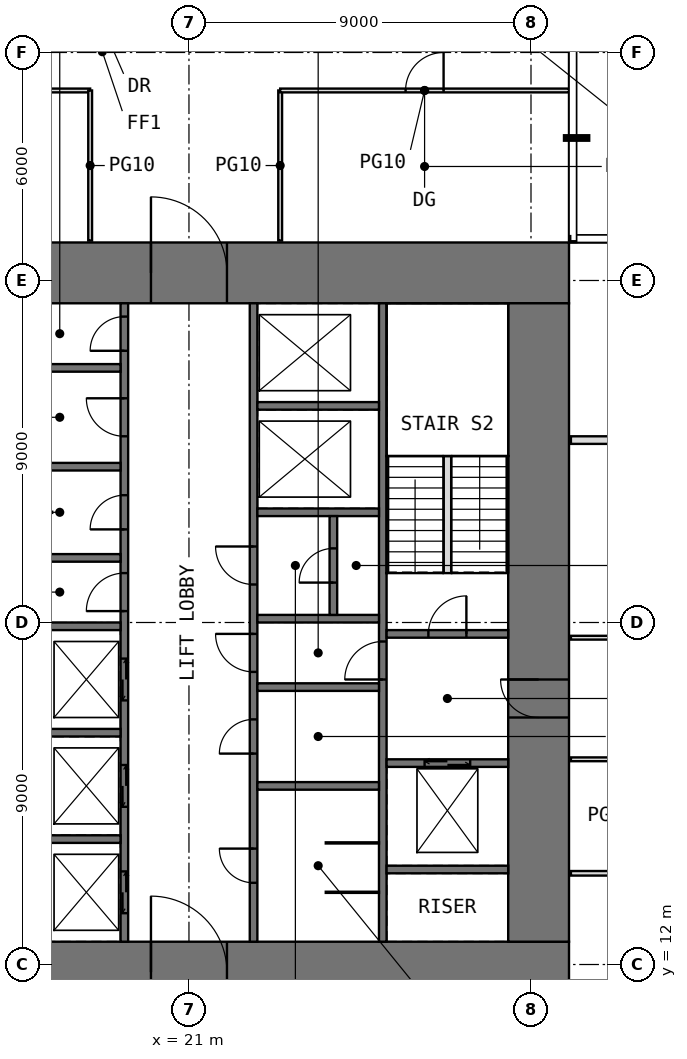
"""IFC4 building model, lengths in metres.
Left out: names, types, materials, properties, quantities, classifications, styles, units other than length and angle.
Written with IfcOpenShell. Run it as: python <this file> out.ifc"""

import sys

from ifc_helpers import new_model, si_unit, direction, frame, frame_2d, origin, place, context, subcontext, project, spatial, rectangle, extrude, element, fill, save


model = new_model("IFC4")
c1 = context("Model", 3, precision=1e-05, world=origin(), true_north=direction((0.0, 1.0)))
c2 = subcontext(c1, "Body", "Model", "MODEL_VIEW")
j1 = project(units=[si_unit("LENGTHUNIT", "METRE"), si_unit("PLANEANGLEUNIT", "RADIAN")], contexts=[c1])
p1 = place(None, origin())
s1 = spatial("IfcSite", under=j1, at=p1, CompositionType="ELEMENT")
p2 = place(p1, origin())
s2 = spatial("IfcBuilding", under=s1, at=p2, CompositionType="ELEMENT")
p3 = place(p2, frame((0.0, 0.0, 116.5)))
s3 = spatial("IfcBuildingStorey", under=s2, at=p3, CompositionType="ELEMENT", Elevation=116.5)
p4 = place(p3, frame((11.0, 11.8, -0.05), z_axis=(0.0, 0.0, 1.0), x_axis=(1.0, 0.0, 0.0)))
e1 = element("IfcWall", 1, at=p4, inside=s3, PredefinedType="SHEAR", context=c2, shape_type="SweptSolid", body=[
    extrude(rectangle(XDim=20.0, YDim=1.6, at=frame_2d((10.0, 0.0))), origin(), (0.0, 0.0, 1.0), 4.0),
])
p5 = place(p4, frame((9.0, 0.0, 0.05)))
e2 = element("IfcOpeningElement", 2, at=p5, cuts=e1, PredefinedType="OPENING", context=c2, shape_type="SweptSolid", body=[
    extrude(rectangle(XDim=2.0, YDim=2.2, at=frame_2d((1.0, 1.1))), frame((0.0, 0.81, 0.0), z_axis=(0.0, -1.0, 0.0), x_axis=(1.0, 0.0, 0.0)), (0.0, 0.0, 1.0), 1.62),
])
p6 = place(p3, frame((11.0, 30.2, -0.05), z_axis=(0.0, 0.0, 1.0), x_axis=(1.0, 0.0, 0.0)))
e3 = element("IfcWall", 3, at=p6, inside=s3, PredefinedType="SHEAR", context=c2, shape_type="SweptSolid", body=[
    extrude(rectangle(XDim=20.0, YDim=1.6, at=frame_2d((10.0, 0.0))), origin(), (0.0, 0.0, 1.0), 4.0),
])
p7 = place(p6, frame((9.0, 0.0, 0.05)))
e4 = element("IfcOpeningElement", 4, at=p7, cuts=e3, PredefinedType="OPENING", context=c2, shape_type="SweptSolid", body=[
    extrude(rectangle(XDim=2.0, YDim=2.2, at=frame_2d((1.0, 1.1))), frame((0.0, 0.81, 0.0), z_axis=(0.0, -1.0, 0.0), x_axis=(1.0, 0.0, 0.0)), (0.0, 0.0, 1.0), 1.62),
])
p8 = place(p3, frame((30.2, 12.6, -0.05), z_axis=(0.0, 0.0, 1.0), x_axis=(0.0, 1.0, 0.0)))
e5 = element("IfcWall", 5, at=p8, inside=s3, PredefinedType="SHEAR", context=c2, shape_type="SweptSolid", body=[
    extrude(rectangle(XDim=16.8, YDim=1.6, at=frame_2d((8.4, 0.0))), origin(), (0.0, 0.0, 1.0), 4.0),
])
p9 = place(p8, frame((5.9, 0.0, 0.05)))
e6 = element("IfcOpeningElement", 6, at=p9, cuts=e5, PredefinedType="OPENING", context=c2, shape_type="SweptSolid", body=[
    extrude(rectangle(XDim=1.0, YDim=2.2, at=frame_2d((0.5, 1.1))), frame((0.0, 0.81, 0.0), z_axis=(0.0, -1.0, 0.0), x_axis=(1.0, 0.0, 0.0)), (0.0, 0.0, 1.0), 1.62),
])
p10 = place(p3, frame((19.3, 12.6, -0.05), z_axis=(0.0, 0.0, 1.0), x_axis=(0.0, 1.0, 0.0)))
e7 = element("IfcWall", 7, at=p10, inside=s3, PredefinedType="SHEAR", context=c2, shape_type="SweptSolid", body=[
    extrude(rectangle(XDim=16.8, YDim=0.2, at=frame_2d((8.4, 0.0))), origin(), (0.0, 0.0, 1.0), 4.0),
])
p11 = place(p10, frame((8.7, 0.0, 0.05)))
e8 = element("IfcOpeningElement", 8, at=p11, cuts=e7, PredefinedType="OPENING", context=c2, shape_type="SweptSolid", body=[
    extrude(rectangle(XDim=1.0, YDim=2.2, at=frame_2d((0.5, 1.1))), frame((0.0, 0.11, 0.0), z_axis=(0.0, -1.0, 0.0), x_axis=(1.0, 0.0, 0.0)), (0.0, 0.0, 1.0), 0.22),
])
p12 = place(p10, frame((10.85, 0.0, 0.05)))
e9 = element("IfcOpeningElement", 9, at=p12, cuts=e7, PredefinedType="OPENING", context=c2, shape_type="SweptSolid", body=[
    extrude(rectangle(XDim=0.9, YDim=2.2, at=frame_2d((0.45, 1.1))), frame((0.0, 0.11, 0.0), z_axis=(0.0, -1.0, 0.0), x_axis=(1.0, 0.0, 0.0)), (0.0, 0.0, 1.0), 0.22),
])
p13 = place(p10, frame((13.3, 0.0, 0.05)))
e10 = element("IfcOpeningElement", 10, at=p13, cuts=e7, PredefinedType="OPENING", context=c2, shape_type="SweptSolid", body=[
    extrude(rectangle(XDim=1.0, YDim=2.2, at=frame_2d((0.5, 1.1))), frame((0.0, 0.11, 0.0), z_axis=(0.0, -1.0, 0.0), x_axis=(1.0, 0.0, 0.0)), (0.0, 0.0, 1.0), 0.22),
])
p14 = place(p10, frame((15.55, 0.0, 0.05)))
e11 = element("IfcOpeningElement", 11, at=p14, cuts=e7, PredefinedType="OPENING", context=c2, shape_type="SweptSolid", body=[
    extrude(rectangle(XDim=0.9, YDim=2.2, at=frame_2d((0.45, 1.1))), frame((0.0, 0.11, 0.0), z_axis=(0.0, -1.0, 0.0), x_axis=(1.0, 0.0, 0.0)), (0.0, 0.0, 1.0), 0.22),
])
p15 = place(p10, frame((0.75, 0.0, 0.05)))
e12 = element("IfcOpeningElement", 12, at=p15, cuts=e7, PredefinedType="OPENING", context=c2, shape_type="SweptSolid", body=[
    extrude(rectangle(XDim=1.1, YDim=2.2, at=frame_2d((0.55, 1.1))), frame((0.0, 0.11, 0.0), z_axis=(0.0, -1.0, 0.0), x_axis=(1.0, 0.0, 0.0)), (0.0, 0.0, 1.0), 0.22),
])
p16 = place(p10, frame((3.55, 0.0, 0.05)))
e13 = element("IfcOpeningElement", 13, at=p16, cuts=e7, PredefinedType="OPENING", context=c2, shape_type="SweptSolid", body=[
    extrude(rectangle(XDim=1.1, YDim=2.2, at=frame_2d((0.55, 1.1))), frame((0.0, 0.11, 0.0), z_axis=(0.0, -1.0, 0.0), x_axis=(1.0, 0.0, 0.0)), (0.0, 0.0, 1.0), 0.22),
])
p17 = place(p10, frame((6.35, 0.0, 0.05)))
e14 = element("IfcOpeningElement", 14, at=p17, cuts=e7, PredefinedType="OPENING", context=c2, shape_type="SweptSolid", body=[
    extrude(rectangle(XDim=1.1, YDim=2.2, at=frame_2d((0.55, 1.1))), frame((0.0, 0.11, 0.0), z_axis=(0.0, -1.0, 0.0), x_axis=(1.0, 0.0, 0.0)), (0.0, 0.0, 1.0), 0.22),
])
p18 = place(p3, frame((22.7, 12.6, -0.05), z_axis=(0.0, 0.0, 1.0), x_axis=(0.0, 1.0, 0.0)))
e15 = element("IfcWall", 15, at=p18, inside=s3, PredefinedType="SHEAR", context=c2, shape_type="SweptSolid", body=[
    extrude(rectangle(XDim=16.8, YDim=0.2, at=frame_2d((8.4, 0.0))), origin(), (0.0, 0.0, 1.0), 4.0),
])
p19 = place(p18, frame((7.1, 0.0, 0.05)))
e16 = element("IfcOpeningElement", 16, at=p19, cuts=e15, PredefinedType="OPENING", context=c2, shape_type="SweptSolid", body=[
    extrude(rectangle(XDim=1.0, YDim=2.2, at=frame_2d((0.5, 1.1))), frame((0.0, 0.11, 0.0), z_axis=(0.0, -1.0, 0.0), x_axis=(1.0, 0.0, 0.0)), (0.0, 0.0, 1.0), 0.22),
])
p20 = place(p18, frame((1.55, 0.0, 0.05)))
e17 = element("IfcOpeningElement", 17, at=p20, cuts=e15, PredefinedType="OPENING", context=c2, shape_type="SweptSolid", body=[
    extrude(rectangle(XDim=0.9, YDim=2.2, at=frame_2d((0.45, 1.1))), frame((0.0, 0.11, 0.0), z_axis=(0.0, -1.0, 0.0), x_axis=(1.0, 0.0, 0.0)), (0.0, 0.0, 1.0), 0.22),
])
p21 = place(p18, frame((4.95, 0.0, 0.05)))
e18 = element("IfcOpeningElement", 18, at=p21, cuts=e15, PredefinedType="OPENING", context=c2, shape_type="SweptSolid", body=[
    extrude(rectangle(XDim=0.9, YDim=2.2, at=frame_2d((0.45, 1.1))), frame((0.0, 0.11, 0.0), z_axis=(0.0, -1.0, 0.0), x_axis=(1.0, 0.0, 0.0)), (0.0, 0.0, 1.0), 0.22),
])
p22 = place(p18, frame((9.4, 0.0, 0.05)))
e19 = element("IfcOpeningElement", 19, at=p22, cuts=e15, PredefinedType="OPENING", context=c2, shape_type="SweptSolid", body=[
    extrude(rectangle(XDim=1.0, YDim=2.2, at=frame_2d((0.5, 1.1))), frame((0.0, 0.11, 0.0), z_axis=(0.0, -1.0, 0.0), x_axis=(1.0, 0.0, 0.0)), (0.0, 0.0, 1.0), 0.22),
])
p23 = place(p3, frame((26.1, 12.6, -0.05), z_axis=(0.0, 0.0, 1.0), x_axis=(0.0, 1.0, 0.0)))
e20 = element("IfcWall", 20, at=p23, inside=s3, PredefinedType="SHEAR", context=c2, shape_type="SweptSolid", body=[
    extrude(rectangle(XDim=16.8, YDim=0.2, at=frame_2d((8.4, 0.0))), origin(), (0.0, 0.0, 1.0), 4.0),
])
p24 = place(p23, frame((6.9, 0.0, 0.05)))
e21 = element("IfcOpeningElement", 21, at=p24, cuts=e20, PredefinedType="OPENING", context=c2, shape_type="SweptSolid", body=[
    extrude(rectangle(XDim=1.0, YDim=2.2, at=frame_2d((0.5, 1.1))), frame((0.0, 0.11, 0.0), z_axis=(0.0, -1.0, 0.0), x_axis=(1.0, 0.0, 0.0)), (0.0, 0.0, 1.0), 0.22),
])
for number, where, z_axis, x_axis in (
    (22, (16.0, 15.3, -0.05), (0.0, 0.0, 1.0), (1.0, 0.0, 0.0)),
    (23, (16.0, 18.1, -0.05), (0.0, 0.0, 1.0), (1.0, 0.0, 0.0)),
    (24, (16.0, 20.9, -0.05), (0.0, 0.0, 1.0), (1.0, 0.0, 0.0)),
    (25, (16.0, 22.7, -0.05), (0.0, 0.0, 1.0), (1.0, 0.0, 0.0)),
    (26, (16.0, 25.1, -0.05), (0.0, 0.0, 1.0), (1.0, 0.0, 0.0)),
    (27, (16.0, 27.7, -0.05), (0.0, 0.0, 1.0), (1.0, 0.0, 0.0)),
    (28, (22.8, 16.7, -0.05), (0.0, 0.0, 1.0), (1.0, 0.0, 0.0)),
    (29, (22.8, 19.3, -0.05), (0.0, 0.0, 1.0), (1.0, 0.0, 0.0)),
    (30, (22.8, 21.1, -0.05), (0.0, 0.0, 1.0), (1.0, 0.0, 0.0)),
    (31, (22.8, 23.9, -0.05), (0.0, 0.0, 1.0), (1.0, 0.0, 0.0)),
    (32, (22.8, 26.7, -0.05), (0.0, 0.0, 1.0), (1.0, 0.0, 0.0)),
    (33, (26.2, 14.5, -0.05), (0.0, 0.0, 1.0), (1.0, 0.0, 0.0)),
):
    element("IfcWall", number, at=place(p3, frame(where, z_axis=z_axis, x_axis=x_axis)), inside=s3, PredefinedType="SHEAR", context=c2, shape_type="SweptSolid", body=[
        extrude(rectangle(XDim=3.2, YDim=0.2, at=frame_2d((1.6, 0.0))), origin(), (0.0, 0.0, 1.0), 4.0),
    ])
p25 = place(p3, frame((26.2, 17.3, -0.05), z_axis=(0.0, 0.0, 1.0), x_axis=(1.0, 0.0, 0.0)))
e34 = element("IfcWall", 34, at=p25, inside=s3, PredefinedType="SHEAR", context=c2, shape_type="SweptSolid", body=[
    extrude(rectangle(XDim=3.2, YDim=0.2, at=frame_2d((1.6, 0.0))), origin(), (0.0, 0.0, 1.0), 4.0),
])
p26 = place(p25, frame((1.0, 0.0, 0.05)))
e35 = element("IfcOpeningElement", 35, at=p26, cuts=e34, PredefinedType="OPENING", context=c2, shape_type="SweptSolid", body=[
    extrude(rectangle(XDim=1.2, YDim=2.2, at=frame_2d((0.6, 1.1))), frame((0.0, 0.11, 0.0), z_axis=(0.0, -1.0, 0.0), x_axis=(1.0, 0.0, 0.0)), (0.0, 0.0, 1.0), 0.22),
])
p27 = place(p3, frame((26.2, 20.7, -0.05), z_axis=(0.0, 0.0, 1.0), x_axis=(1.0, 0.0, 0.0)))
e36 = element("IfcWall", 36, at=p27, inside=s3, PredefinedType="SHEAR", context=c2, shape_type="SweptSolid", body=[
    extrude(rectangle(XDim=3.2, YDim=0.2, at=frame_2d((1.6, 0.0))), origin(), (0.0, 0.0, 1.0), 4.0),
])
p28 = place(p27, frame((1.1, 0.0, 0.05)))
e37 = element("IfcOpeningElement", 37, at=p28, cuts=e36, PredefinedType="OPENING", context=c2, shape_type="SweptSolid", body=[
    extrude(rectangle(XDim=1.0, YDim=2.2, at=frame_2d((0.5, 1.1))), frame((0.0, 0.11, 0.0), z_axis=(0.0, -1.0, 0.0), x_axis=(1.0, 0.0, 0.0)), (0.0, 0.0, 1.0), 0.22),
])
for number, where, z_axis, x_axis in (
    (38, (24.6, 13.9, 0.0), (0.0, 0.0, 1.0), (1.0, 0.0, 0.0)),
    (39, (24.6, 15.2, 0.0), (0.0, 0.0, 1.0), (1.0, 0.0, 0.0)),
):
    element("IfcWall", number, at=place(p3, frame(where, z_axis=z_axis, x_axis=x_axis)), inside=s3, PredefinedType="PARTITIONING", context=c2, shape_type="SweptSolid", body=[
        extrude(rectangle(XDim=1.4, YDim=0.03, at=frame_2d((0.7, 0.0))), origin(), (0.0, 0.0, 1.0), 3.75),
    ])
p29 = place(p3, frame((24.8, 21.2, -0.05), z_axis=(0.0, 0.0, 1.0), x_axis=(0.0, 1.0, 0.0)))
e40 = element("IfcWall", 40, at=p29, inside=s3, PredefinedType="SHEAR", context=c2, shape_type="SweptSolid", body=[
    extrude(rectangle(XDim=2.6, YDim=0.2, at=frame_2d((1.3, 0.0))), origin(), (0.0, 0.0, 1.0), 4.0),
])
p30 = place(p29, frame((0.85, 0.0, 0.05)))
e41 = element("IfcOpeningElement", 41, at=p30, cuts=e40, PredefinedType="OPENING", context=c2, shape_type="SweptSolid", body=[
    extrude(rectangle(XDim=0.9, YDim=2.2, at=frame_2d((0.45, 1.1))), frame((0.0, 0.11, 0.0), z_axis=(0.0, -1.0, 0.0), x_axis=(1.0, 0.0, 0.0)), (0.0, 0.0, 1.0), 0.22),
])
p31 = place(p3, frame((14.6, 35.0, 0.0), z_axis=(0.0, 0.0, 1.0), x_axis=(1.0, 0.0, 0.0)))
e42 = element("IfcWall", 42, at=p31, inside=s3, PredefinedType="PARTITIONING", context=c2, shape_type="SweptSolid", body=[
    extrude(rectangle(XDim=3.8, YDim=0.1, at=frame_2d((1.9, 0.0))), origin(), (0.0, 0.0, 1.0), 3.75),
])
p32 = place(p31, frame((1.4, 0.0, 0.0)))
e43 = element("IfcOpeningElement", 43, at=p32, cuts=e42, PredefinedType="OPENING", context=c2, shape_type="SweptSolid", body=[
    extrude(rectangle(XDim=1.0, YDim=2.4, at=frame_2d((0.5, 1.2))), frame((0.0, 0.06, 0.0), z_axis=(0.0, -1.0, 0.0), x_axis=(1.0, 0.0, 0.0)), (0.0, 0.0, 1.0), 0.12),
])
for number, where, z_axis, x_axis in (
    (44, (18.4, 31.05, 0.0), (0.0, 0.0, 1.0), (0.0, 1.0, 0.0)),
    (45, (23.4, 31.05, 0.0), (0.0, 0.0, 1.0), (0.0, 1.0, 0.0)),
):
    element("IfcWall", number, at=place(p3, frame(where, z_axis=z_axis, x_axis=x_axis)), inside=s3, PredefinedType="PARTITIONING", context=c2, shape_type="SweptSolid", body=[
        extrude(rectangle(XDim=3.95, YDim=0.1, at=frame_2d((1.975, 0.0))), origin(), (0.0, 0.0, 1.0), 3.75),
    ])
p33 = place(p3, frame((23.4, 35.0, 0.0), z_axis=(0.0, 0.0, 1.0), x_axis=(1.0, 0.0, 0.0)))
e46 = element("IfcWall", 46, at=p33, inside=s3, PredefinedType="PARTITIONING", context=c2, shape_type="SweptSolid", body=[
    extrude(rectangle(XDim=7.6, YDim=0.1, at=frame_2d((3.8, 0.0))), origin(), (0.0, 0.0, 1.0), 3.75),
])
p34 = place(p33, frame((3.3, 0.0, 0.0)))
e47 = element("IfcOpeningElement", 47, at=p34, cuts=e46, PredefinedType="OPENING", context=c2, shape_type="SweptSolid", body=[
    extrude(rectangle(XDim=1.0, YDim=2.4, at=frame_2d((0.5, 1.2))), frame((0.0, 0.06, 0.0), z_axis=(0.0, -1.0, 0.0), x_axis=(1.0, 0.0, 0.0)), (0.0, 0.0, 1.0), 0.12),
])
p35 = place(p3, frame((31.05, 14.4, 0.0), z_axis=(0.0, 0.0, 1.0), x_axis=(1.0, 0.0, 0.0)))
e48 = element("IfcWall", 48, at=p35, inside=s3, PredefinedType="PARTITIONING", context=c2, shape_type="SweptSolid", body=[
    extrude(rectangle(XDim=3.45, YDim=0.12, at=frame_2d((1.725, 0.0))), origin(), (0.0, 0.0, 1.0), 3.75),
])
for number, where, z_axis, x_axis in (
    (49, (31.05, 17.4, 0.0), (0.0, 0.0, 1.0), (1.0, 0.0, 0.0)),
    (50, (31.05, 20.6, 0.0), (0.0, 0.0, 1.0), (1.0, 0.0, 0.0)),
):
    element("IfcWall", number, at=place(p3, frame(where, z_axis=z_axis, x_axis=x_axis)), inside=s3, PredefinedType="PARTITIONING", context=c2, shape_type="SweptSolid", body=[
        extrude(rectangle(XDim=3.95, YDim=0.1, at=frame_2d((1.975, 0.0))), origin(), (0.0, 0.0, 1.0), 3.75),
    ])
p36 = place(p3, frame((31.05, 25.8, 0.0), z_axis=(0.0, 0.0, 1.0), x_axis=(1.0, 0.0, 0.0)))
e51 = element("IfcWall", 51, at=p36, inside=s3, PredefinedType="PARTITIONING", context=c2, shape_type="SweptSolid", body=[
    extrude(rectangle(XDim=3.95, YDim=0.2, at=frame_2d((1.975, 0.0))), origin(), (0.0, 0.0, 1.0), 3.75),
])
p37 = place(p3, frame((27.8, 22.3, 0.0), z_axis=(0.0, 0.0, 1.0), x_axis=(0.0, 1.0, 0.0)))
e52 = element("IfcWall", 52, at=p37, inside=s3, PredefinedType="PARTITIONING", context=c2, shape_type="SweptSolid", body=[
    extrude(rectangle(XDim=3.08, YDim=0.2, at=frame_2d((1.54, 0.0))), origin(), (0.0, 0.0, 1.0), 4.0),
])
p38 = place(p5, origin())
e53 = element("IfcDoor", 53, at=p38, inside=s3, OperationType="DOUBLE_DOOR_SINGLE_SWING", PredefinedType="DOOR", context=c2, shape_type="SweptSolid", body=[
    extrude(rectangle(XDim=2.0, YDim=2.2, at=frame_2d((1.0, 1.1))), frame((0.0, 0.025, 0.0), z_axis=(0.0, -1.0, 0.0), x_axis=(1.0, 0.0, 0.0)), (0.0, 0.0, 1.0), 0.05),
])
fill(e2, e53)
p39 = place(p7, origin())
e54 = element("IfcDoor", 54, at=p39, inside=s3, OperationType="DOUBLE_DOOR_SINGLE_SWING", PredefinedType="DOOR", context=c2, shape_type="SweptSolid", body=[
    extrude(rectangle(XDim=2.0, YDim=2.2, at=frame_2d((1.0, 1.1))), frame((0.0, 0.025, 0.0), z_axis=(0.0, -1.0, 0.0), x_axis=(1.0, 0.0, 0.0)), (0.0, 0.0, 1.0), 0.05),
])
fill(e4, e54)
p40 = place(p9, origin())
e55 = element("IfcDoor", 55, at=p40, inside=s3, OperationType="SINGLE_SWING_RIGHT", PredefinedType="DOOR", context=c2, shape_type="SweptSolid", body=[
    extrude(rectangle(XDim=1.0, YDim=2.2, at=frame_2d((0.5, 1.1))), frame((0.0, 0.025, 0.0), z_axis=(0.0, -1.0, 0.0), x_axis=(1.0, 0.0, 0.0)), (0.0, 0.0, 1.0), 0.05),
])
fill(e6, e55)
p41 = place(p28, origin())
e56 = element("IfcDoor", 56, at=p41, inside=s3, OperationType="SINGLE_SWING_RIGHT", PredefinedType="DOOR", context=c2, shape_type="SweptSolid", body=[
    extrude(rectangle(XDim=1.0, YDim=2.2, at=frame_2d((0.5, 1.1))), frame((0.0, 0.025, 0.0), z_axis=(0.0, -1.0, 0.0), x_axis=(1.0, 0.0, 0.0)), (0.0, 0.0, 1.0), 0.05),
])
fill(e37, e56)
p42 = place(p24, origin())
e57 = element("IfcDoor", 57, at=p42, inside=s3, OperationType="SINGLE_SWING_LEFT", PredefinedType="DOOR", context=c2, shape_type="SweptSolid", body=[
    extrude(rectangle(XDim=1.0, YDim=2.2, at=frame_2d((0.5, 1.1))), frame((0.0, 0.025, 0.0), z_axis=(0.0, -1.0, 0.0), x_axis=(1.0, 0.0, 0.0)), (0.0, 0.0, 1.0), 0.05),
])
fill(e21, e57)
p43 = place(p11, origin())
e58 = element("IfcDoor", 58, at=p43, inside=s3, OperationType="SINGLE_SWING_LEFT", PredefinedType="DOOR", context=c2, shape_type="SweptSolid", body=[
    extrude(rectangle(XDim=1.0, YDim=2.2, at=frame_2d((0.5, 1.1))), frame((0.0, 0.025, 0.0), z_axis=(0.0, -1.0, 0.0), x_axis=(1.0, 0.0, 0.0)), (0.0, 0.0, 1.0), 0.05),
])
fill(e8, e58)
p44 = place(p19, origin())
e59 = element("IfcDoor", 59, at=p44, inside=s3, OperationType="SINGLE_SWING_RIGHT", PredefinedType="DOOR", context=c2, shape_type="SweptSolid", body=[
    extrude(rectangle(XDim=1.0, YDim=2.2, at=frame_2d((0.5, 1.1))), frame((0.0, 0.025, 0.0), z_axis=(0.0, -1.0, 0.0), x_axis=(1.0, 0.0, 0.0)), (0.0, 0.0, 1.0), 0.05),
])
fill(e16, e59)
p45 = place(p12, origin())
e60 = element("IfcDoor", 60, at=p45, inside=s3, OperationType="SINGLE_SWING_LEFT", PredefinedType="DOOR", context=c2, shape_type="SweptSolid", body=[
    extrude(rectangle(XDim=0.9, YDim=2.2, at=frame_2d((0.45, 1.1))), frame((0.0, 0.025, 0.0), z_axis=(0.0, -1.0, 0.0), x_axis=(1.0, 0.0, 0.0)), (0.0, 0.0, 1.0), 0.05),
])
fill(e9, e60)
p46 = place(p13, origin())
e61 = element("IfcDoor", 61, at=p46, inside=s3, OperationType="SINGLE_SWING_RIGHT", PredefinedType="DOOR", context=c2, shape_type="SweptSolid", body=[
    extrude(rectangle(XDim=1.0, YDim=2.2, at=frame_2d((0.5, 1.1))), frame((0.0, 0.025, 0.0), z_axis=(0.0, -1.0, 0.0), x_axis=(1.0, 0.0, 0.0)), (0.0, 0.0, 1.0), 0.05),
])
fill(e10, e61)
p47 = place(p14, origin())
e62 = element("IfcDoor", 62, at=p47, inside=s3, OperationType="SINGLE_SWING_LEFT", PredefinedType="DOOR", context=c2, shape_type="SweptSolid", body=[
    extrude(rectangle(XDim=0.9, YDim=2.2, at=frame_2d((0.45, 1.1))), frame((0.0, 0.025, 0.0), z_axis=(0.0, -1.0, 0.0), x_axis=(1.0, 0.0, 0.0)), (0.0, 0.0, 1.0), 0.05),
])
fill(e11, e62)
p48 = place(p20, origin())
e63 = element("IfcDoor", 63, at=p48, inside=s3, OperationType="SINGLE_SWING_RIGHT", PredefinedType="DOOR", context=c2, shape_type="SweptSolid", body=[
    extrude(rectangle(XDim=0.9, YDim=2.2, at=frame_2d((0.45, 1.1))), frame((0.0, 0.025, 0.0), z_axis=(0.0, -1.0, 0.0), x_axis=(1.0, 0.0, 0.0)), (0.0, 0.0, 1.0), 0.05),
])
fill(e17, e63)
p49 = place(p21, origin())
e64 = element("IfcDoor", 64, at=p49, inside=s3, OperationType="SINGLE_SWING_LEFT", PredefinedType="DOOR", context=c2, shape_type="SweptSolid", body=[
    extrude(rectangle(XDim=0.9, YDim=2.2, at=frame_2d((0.45, 1.1))), frame((0.0, 0.025, 0.0), z_axis=(0.0, -1.0, 0.0), x_axis=(1.0, 0.0, 0.0)), (0.0, 0.0, 1.0), 0.05),
])
fill(e18, e64)
p50 = place(p22, origin())
e65 = element("IfcDoor", 65, at=p50, inside=s3, OperationType="SINGLE_SWING_RIGHT", PredefinedType="DOOR", context=c2, shape_type="SweptSolid", body=[
    extrude(rectangle(XDim=1.0, YDim=2.2, at=frame_2d((0.5, 1.1))), frame((0.0, 0.025, 0.0), z_axis=(0.0, -1.0, 0.0), x_axis=(1.0, 0.0, 0.0)), (0.0, 0.0, 1.0), 0.05),
])
fill(e19, e65)
p51 = place(p30, origin())
e66 = element("IfcDoor", 66, at=p51, inside=s3, OperationType="SINGLE_SWING_LEFT", PredefinedType="DOOR", context=c2, shape_type="SweptSolid", body=[
    extrude(rectangle(XDim=0.9, YDim=2.2, at=frame_2d((0.45, 1.1))), frame((0.0, 0.025, 0.0), z_axis=(0.0, -1.0, 0.0), x_axis=(1.0, 0.0, 0.0)), (0.0, 0.0, 1.0), 0.05),
])
fill(e41, e66)
p52 = place(p34, origin())
e67 = element("IfcDoor", 67, at=p52, inside=s3, OperationType="SINGLE_SWING_RIGHT", PredefinedType="DOOR", context=c2, shape_type="SweptSolid", body=[
    extrude(rectangle(XDim=1.0, YDim=2.4, at=frame_2d((0.5, 1.2))), frame((0.0, 0.025, 0.0), z_axis=(0.0, -1.0, 0.0), x_axis=(1.0, 0.0, 0.0)), (0.0, 0.0, 1.0), 0.05),
])
fill(e47, e67)
p53 = place(p15, origin())
e68 = element("IfcDoor", 68, at=p53, inside=s3, OperationType="DOUBLE_DOOR_SLIDING", PredefinedType="DOOR", context=c2, shape_type="SweptSolid", body=[
    extrude(rectangle(XDim=1.1, YDim=2.2, at=frame_2d((0.55, 1.1))), frame((0.0, 0.025, 0.0), z_axis=(0.0, -1.0, 0.0), x_axis=(1.0, 0.0, 0.0)), (0.0, 0.0, 1.0), 0.05),
])
fill(e12, e68)
p54 = place(p16, origin())
e69 = element("IfcDoor", 69, at=p54, inside=s3, OperationType="DOUBLE_DOOR_SLIDING", PredefinedType="DOOR", context=c2, shape_type="SweptSolid", body=[
    extrude(rectangle(XDim=1.1, YDim=2.2, at=frame_2d((0.55, 1.1))), frame((0.0, 0.025, 0.0), z_axis=(0.0, -1.0, 0.0), x_axis=(1.0, 0.0, 0.0)), (0.0, 0.0, 1.0), 0.05),
])
fill(e13, e69)
p55 = place(p17, origin())
e70 = element("IfcDoor", 70, at=p55, inside=s3, OperationType="DOUBLE_DOOR_SLIDING", PredefinedType="DOOR", context=c2, shape_type="SweptSolid", body=[
    extrude(rectangle(XDim=1.1, YDim=2.2, at=frame_2d((0.55, 1.1))), frame((0.0, 0.025, 0.0), z_axis=(0.0, -1.0, 0.0), x_axis=(1.0, 0.0, 0.0)), (0.0, 0.0, 1.0), 0.05),
])
fill(e14, e70)
p56 = place(p26, origin())
e71 = element("IfcDoor", 71, at=p56, inside=s3, OperationType="DOUBLE_DOOR_SLIDING", PredefinedType="DOOR", context=c2, shape_type="SweptSolid", body=[
    extrude(rectangle(XDim=1.2, YDim=2.2, at=frame_2d((0.6, 1.1))), frame((0.0, 0.025, 0.0), z_axis=(0.0, -1.0, 0.0), x_axis=(1.0, 0.0, 0.0)), (0.0, 0.0, 1.0), 0.05),
])
fill(e35, e71)
save(model, sys.argv[1])
